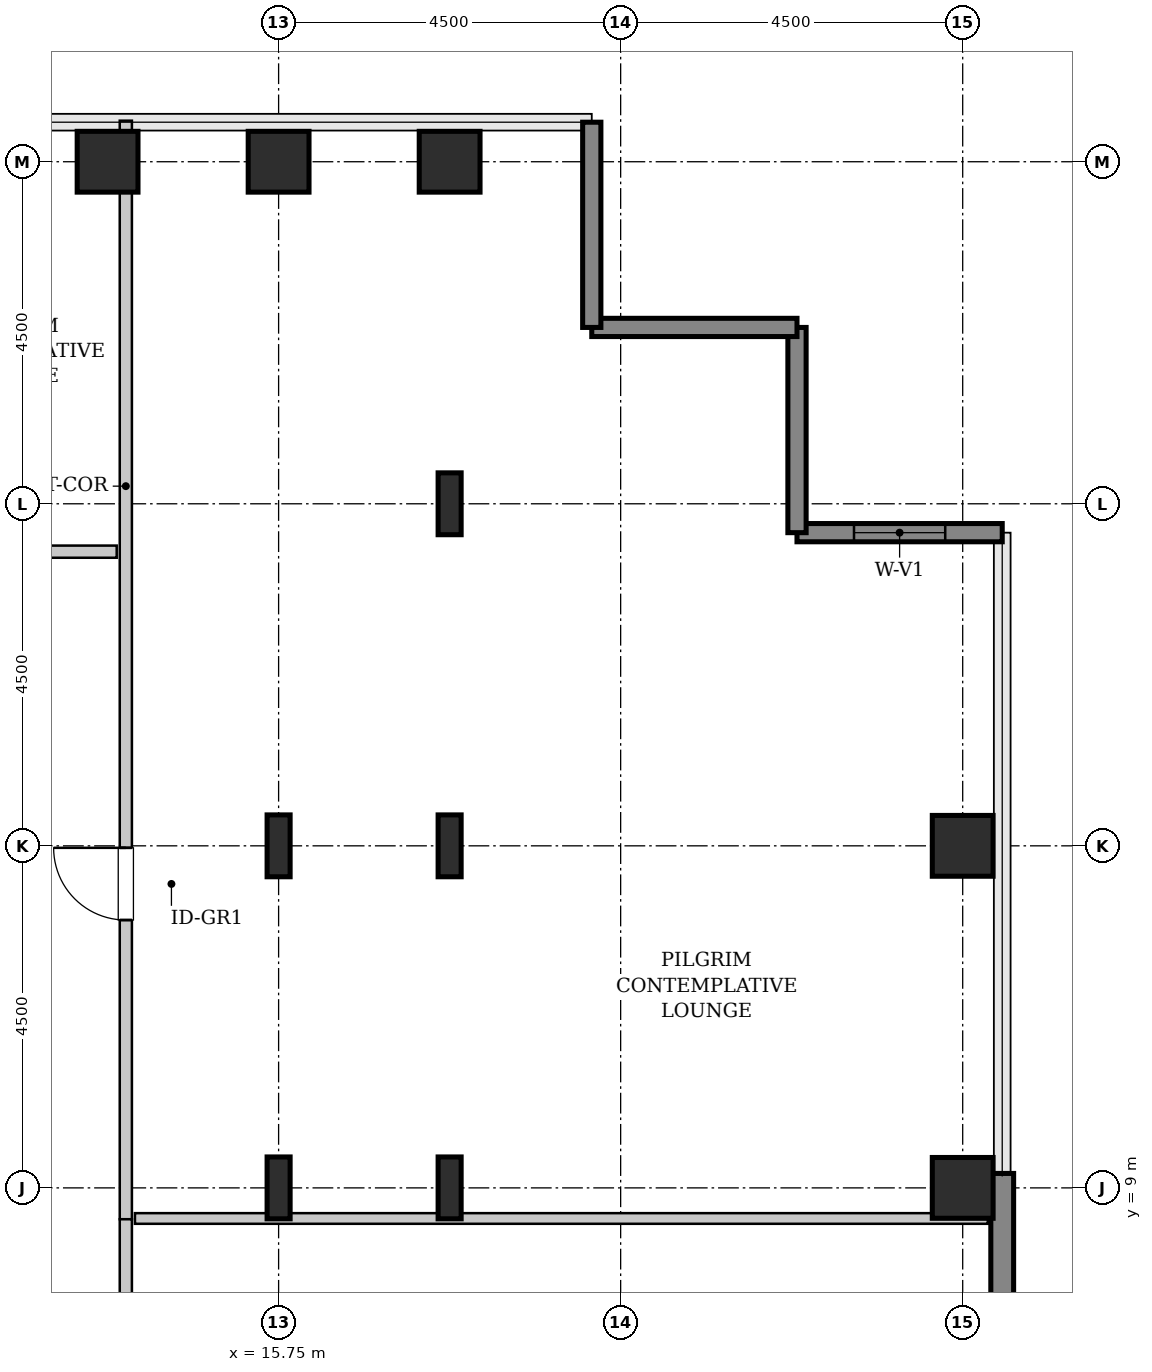
"""IFC4 building model, lengths in metres.
Left out: names, types, materials, properties, quantities, classifications, styles, units other than length and angle.
Written with IfcOpenShell. Run it as: python <this file> out.ifc"""

import sys

from ifc_helpers import new_model, si_unit, direction, frame, frame_2d, origin, origin_2d, place, context, subcontext, project, spatial, rectangle, hollow_rectangle, i_section, extrude, source, transform, mapped, element, fill, save


model = new_model("IFC4")
c1 = context("Model", 3, precision=1e-05, world=origin(), true_north=direction((0.0, 1.0)))
c2 = subcontext(c1, "Body", "Model", "MODEL_VIEW")
j1 = project(units=[si_unit("LENGTHUNIT", "METRE"), si_unit("PLANEANGLEUNIT", "RADIAN")], contexts=[c1])
p1 = place(None, origin())
s1 = spatial("IfcSite", under=j1, at=p1, CompositionType="ELEMENT")
p2 = place(p1, origin())
s2 = spatial("IfcBuilding", under=s1, at=p2, CompositionType="ELEMENT")
p3 = place(p2, frame((0.0, 0.0, 183.0)))
s3 = spatial("IfcBuildingStorey", under=s2, at=p3, CompositionType="ELEMENT", Elevation=183.0)
m1 = source(origin(), c2, "Body", "SweptSolid", [
    extrude(hollow_rectangle(XDim=0.8, YDim=0.8, WallThickness=0.04, InnerFilletRadius=0.04, OuterFilletRadius=0.08, at=origin_2d()), origin(), (0.0, 0.0, 1.0), 3.8),
])
p4 = place(p3, frame((13.5, 22.5, 0.0), z_axis=(0.0, 0.0, 1.0), x_axis=(1.0, 0.0, 0.0)))
e1 = element("IfcColumn", 1, at=p4, inside=s3, PredefinedType="COLUMN", context=c2, shape_type="MappedRepresentation", body=[
    mapped(m1, transform((0.0, 0.0, 0.0), x_axis=(1.0, 0.0, 0.0), y_axis=(0.0, 1.0, 0.0), z_axis=(0.0, 0.0, 1.0), scale=1.0)),
])
m2 = source(origin(), c2, "Body", "SweptSolid", [
    extrude(i_section(OverallWidth=0.303, OverallDepth=0.814, WebThickness=0.021, FlangeThickness=0.04, FilletRadius=0.03, at=origin_2d()), origin(), (0.0, 0.0, 1.0), 3.8),
])
for number, where, z_axis, x_axis in (
    (2, (15.75, 9.0, 0.0), (0.0, 0.0, 1.0), (1.0, 0.0, 0.0)),
    (3, (15.75, 13.5, 0.0), (0.0, 0.0, 1.0), (1.0, 0.0, 0.0)),
):
    element("IfcColumn", number, at=place(p3, frame(where, z_axis=z_axis, x_axis=x_axis)), inside=s3, PredefinedType="COLUMN", context=c2, shape_type="MappedRepresentation", body=[
        mapped(m2, transform((0.0, 0.0, 0.0), x_axis=(1.0, 0.0, 0.0), y_axis=(0.0, 1.0, 0.0), z_axis=(0.0, 0.0, 1.0), scale=1.0)),
    ])
p5 = place(p3, frame((15.75, 22.5, 0.0), z_axis=(0.0, 0.0, 1.0), x_axis=(1.0, 0.0, 0.0)))
e4 = element("IfcColumn", 4, at=p5, inside=s3, PredefinedType="COLUMN", context=c2, shape_type="MappedRepresentation", body=[
    mapped(m1, transform((0.0, 0.0, 0.0), x_axis=(1.0, 0.0, 0.0), y_axis=(0.0, 1.0, 0.0), z_axis=(0.0, 0.0, 1.0), scale=1.0)),
])
for number, where, z_axis, x_axis in (
    (5, (18.0, 9.0, 0.0), (0.0, 0.0, 1.0), (1.0, 0.0, 0.0)),
    (6, (18.0, 13.5, 0.0), (0.0, 0.0, 1.0), (1.0, 0.0, 0.0)),
    (7, (18.0, 18.0, 0.0), (0.0, 0.0, 1.0), (1.0, 0.0, 0.0)),
):
    element("IfcColumn", number, at=place(p3, frame(where, z_axis=z_axis, x_axis=x_axis)), inside=s3, PredefinedType="COLUMN", context=c2, shape_type="MappedRepresentation", body=[
        mapped(m2, transform((0.0, 0.0, 0.0), x_axis=(1.0, 0.0, 0.0), y_axis=(0.0, 1.0, 0.0), z_axis=(0.0, 0.0, 1.0), scale=1.0)),
    ])
for number, where, z_axis, x_axis in (
    (8, (18.0, 22.5, 0.0), (0.0, 0.0, 1.0), (1.0, 0.0, 0.0)),
    (9, (24.75, 9.0, 0.0), (0.0, 0.0, 1.0), (1.0, 0.0, 0.0)),
    (10, (24.75, 13.5, 0.0), (0.0, 0.0, 1.0), (1.0, 0.0, 0.0)),
):
    element("IfcColumn", number, at=place(p3, frame(where, z_axis=z_axis, x_axis=x_axis)), inside=s3, PredefinedType="COLUMN", context=c2, shape_type="MappedRepresentation", body=[
        mapped(m1, transform((0.0, 0.0, 0.0), x_axis=(1.0, 0.0, 0.0), y_axis=(0.0, 1.0, 0.0), z_axis=(0.0, 0.0, 1.0), scale=1.0)),
    ])
m3 = source(origin(), c2, "Body", "SweptSolid", [
    extrude(rectangle(XDim=4.88, YDim=0.3, at=frame_2d((2.44, 0.0))), origin(), (0.0, 0.0, 1.0), 3.55),
])
p6 = place(p3, frame((25.27, 4.31, 0.0), z_axis=(0.0, 0.0, 1.0), x_axis=(0.0, 1.0, 0.0)))
e11 = element("IfcWall", 11, at=p6, inside=s3, PredefinedType="SHEAR", context=c2, shape_type="MappedRepresentation", body=[
    mapped(m3, transform((0.0, 0.0, 0.0), x_axis=(1.0, 0.0, 0.0), y_axis=(0.0, 1.0, 0.0), z_axis=(0.0, 0.0, 1.0), scale=1.0)),
])
m4 = source(origin(), c2, "Body", "SweptSolid", [
    extrude(rectangle(XDim=2.7, YDim=0.24, at=frame_2d((1.35, 0.0))), origin(), (0.0, 0.0, 1.0), 3.55),
])
p7 = place(p3, frame((25.27, 17.62, 0.0), z_axis=(0.0, 0.0, 1.0), x_axis=(-1.0, 0.0, 0.0)))
e12 = element("IfcWall", 12, at=p7, inside=s3, PredefinedType="SHEAR", context=c2, shape_type="MappedRepresentation", body=[
    mapped(m4, transform((0.0, 0.0, 0.0), x_axis=(1.0, 0.0, 0.0), y_axis=(0.0, 1.0, 0.0), z_axis=(0.0, 0.0, 1.0), scale=1.0)),
])
p8 = place(p7, frame((0.75, 0.0, 0.85)))
e13 = element("IfcOpeningElement", 13, at=p8, cuts=e12, PredefinedType="OPENING", context=c2, shape_type="SweptSolid", body=[
    extrude(rectangle(XDim=1.2, YDim=1.8, at=frame_2d((0.6, 0.9))), frame((0.0, 0.13, 0.0), z_axis=(0.0, -1.0, 0.0), x_axis=(1.0, 0.0, 0.0)), (0.0, 0.0, 1.0), 0.26),
])
for number, where, z_axis, x_axis in (
    (14, (22.57, 17.62, 0.0), (0.0, 0.0, 1.0), (0.0, 1.0, 0.0)),
    (15, (22.57, 20.32, 0.0), (0.0, 0.0, 1.0), (-1.0, 0.0, 0.0)),
    (16, (19.87, 20.32, 0.0), (0.0, 0.0, 1.0), (0.0, 1.0, 0.0)),
):
    element("IfcWall", number, at=place(p3, frame(where, z_axis=z_axis, x_axis=x_axis)), inside=s3, PredefinedType="SHEAR", context=c2, shape_type="MappedRepresentation", body=[
        mapped(m4, transform((0.0, 0.0, 0.0), x_axis=(1.0, 0.0, 0.0), y_axis=(0.0, 1.0, 0.0), z_axis=(0.0, 0.0, 1.0), scale=1.0)),
    ])
m5 = source(origin(), c2, "Body", "SweptSolid", [
    extrude(rectangle(XDim=14.453, YDim=0.16, at=frame_2d((7.226, 0.0))), origin(), (0.0, 0.0, 1.0), 3.535),
])
p9 = place(p3, frame((13.74, 8.587, 0.0), z_axis=(0.0, 0.0, 1.0), x_axis=(0.0, 1.0, 0.0)))
e17 = element("IfcWall", 17, at=p9, inside=s3, PredefinedType="PARTITIONING", context=c2, shape_type="MappedRepresentation", body=[
    mapped(m5, transform((0.0, 0.0, 0.0), x_axis=(1.0, 0.0, 0.0), y_axis=(0.0, 1.0, 0.0), z_axis=(0.0, 0.0, 1.0), scale=1.0)),
])
p10 = place(p9, frame((3.936, 0.0, 0.0)))
e18 = element("IfcOpeningElement", 18, at=p10, cuts=e17, PredefinedType="OPENING", context=c2, shape_type="SweptSolid", body=[
    extrude(rectangle(XDim=0.95, YDim=2.1, at=frame_2d((0.475, 1.05))), frame((0.0, 0.09, 0.0), z_axis=(0.0, -1.0, 0.0), x_axis=(1.0, 0.0, 0.0)), (0.0, 0.0, 1.0), 0.18),
])
m6 = source(origin(), c2, "Body", "SweptSolid", [
    extrude(rectangle(XDim=11.22, YDim=0.14, at=frame_2d((5.61, 0.0))), origin(), (0.0, 0.0, 1.0), 2.875),
])
p11 = place(p3, frame((13.86, 8.597, 0.0), z_axis=(0.0, 0.0, 1.0), x_axis=(1.0, 0.0, 0.0)))
e19 = element("IfcWall", 19, at=p11, inside=s3, PredefinedType="PARTITIONING", context=c2, shape_type="MappedRepresentation", body=[
    mapped(m6, transform((0.0, 0.0, 0.0), x_axis=(1.0, 0.0, 0.0), y_axis=(0.0, 1.0, 0.0), z_axis=(0.0, 0.0, 1.0), scale=1.0)),
])
m7 = source(origin(), c2, "Body", "SweptSolid", [
    extrude(rectangle(XDim=7.196, YDim=0.16, at=frame_2d((3.598, 0.0))), origin(), (0.0, 0.0, 1.0), 3.535),
])
p12 = place(p3, frame((13.74, 1.391, 0.0), z_axis=(0.0, 0.0, 1.0), x_axis=(0.0, 1.0, 0.0)))
e20 = element("IfcWall", 20, at=p12, inside=s3, PredefinedType="PARTITIONING", context=c2, shape_type="MappedRepresentation", body=[
    mapped(m7, transform((0.0, 0.0, 0.0), x_axis=(1.0, 0.0, 0.0), y_axis=(0.0, 1.0, 0.0), z_axis=(0.0, 0.0, 1.0), scale=1.0)),
])
p13 = place(p12, frame((3.123, 0.0, 0.0)))
e21 = element("IfcOpeningElement", 21, at=p13, cuts=e20, PredefinedType="OPENING", context=c2, shape_type="SweptSolid", body=[
    extrude(rectangle(XDim=0.95, YDim=2.1, at=frame_2d((0.475, 1.05))), frame((0.0, 0.09, 0.0), z_axis=(0.0, -1.0, 0.0), x_axis=(1.0, 0.0, 0.0)), (0.0, 0.0, 1.0), 0.18),
])
m8 = source(origin(), c2, "Body", "SweptSolid", [
    extrude(rectangle(XDim=5.225, YDim=0.16, at=frame_2d((2.613, 0.0))), origin(), (0.0, 0.0, 1.0), 3.535),
])
p14 = place(p3, frame((8.395, 17.37, 0.0), z_axis=(0.0, 0.0, 1.0), x_axis=(1.0, 0.0, 0.0)))
e22 = element("IfcWall", 22, at=p14, inside=s3, PredefinedType="PARTITIONING", context=c2, shape_type="MappedRepresentation", body=[
    mapped(m8, transform((0.0, 0.0, 0.0), x_axis=(1.0, 0.0, 0.0), y_axis=(0.0, 1.0, 0.0), z_axis=(0.0, 0.0, 1.0), scale=1.0)),
])
p15 = place(p14, frame((1.543, 0.0, 0.0)))
e23 = element("IfcOpeningElement", 23, at=p15, cuts=e22, PredefinedType="OPENING", context=c2, shape_type="SweptSolid", body=[
    extrude(rectangle(XDim=0.95, YDim=2.1, at=frame_2d((0.475, 1.05))), frame((0.0, 0.09, 0.0), z_axis=(0.0, -1.0, 0.0), x_axis=(1.0, 0.0, 0.0)), (0.0, 0.0, 1.0), 0.18),
])
m9 = source(origin(), c2, "Body", "SweptSolid", [
    extrude(rectangle(XDim=1.2, YDim=1.8, at=frame_2d((0.6, 0.9))), frame((0.0, 0.03, 0.0), z_axis=(0.0, -1.0, 0.0), x_axis=(1.0, 0.0, 0.0)), (0.0, 0.0, 1.0), 0.06),
])
p16 = place(p8, origin())
e24 = element("IfcWindow", 24, at=p16, inside=s3, PartitioningType="SINGLE_PANEL", PredefinedType="WINDOW", context=c2, shape_type="MappedRepresentation", body=[
    mapped(m9, transform((0.0, 0.0, 0.0), x_axis=(1.0, 0.0, 0.0), y_axis=(0.0, 1.0, 0.0), z_axis=(0.0, 0.0, 1.0), scale=1.0)),
])
fill(e13, e24)
m10 = source(origin(), c2, "Body", "SweptSolid", [
    extrude(rectangle(XDim=0.95, YDim=2.1, at=frame_2d((0.475, 1.05))), frame((0.0, 0.025, 0.0), z_axis=(0.0, -1.0, 0.0), x_axis=(1.0, 0.0, 0.0)), (0.0, 0.0, 1.0), 0.05),
])
p17 = place(p10, origin())
e25 = element("IfcDoor", 25, at=p17, inside=s3, OperationType="SINGLE_SWING_RIGHT", PredefinedType="DOOR", context=c2, shape_type="MappedRepresentation", body=[
    mapped(m10, transform((0.0, 0.0, 0.0), x_axis=(1.0, 0.0, 0.0), y_axis=(0.0, 1.0, 0.0), z_axis=(0.0, 0.0, 1.0), scale=1.0)),
])
fill(e18, e25)
save(model, sys.argv[1])
